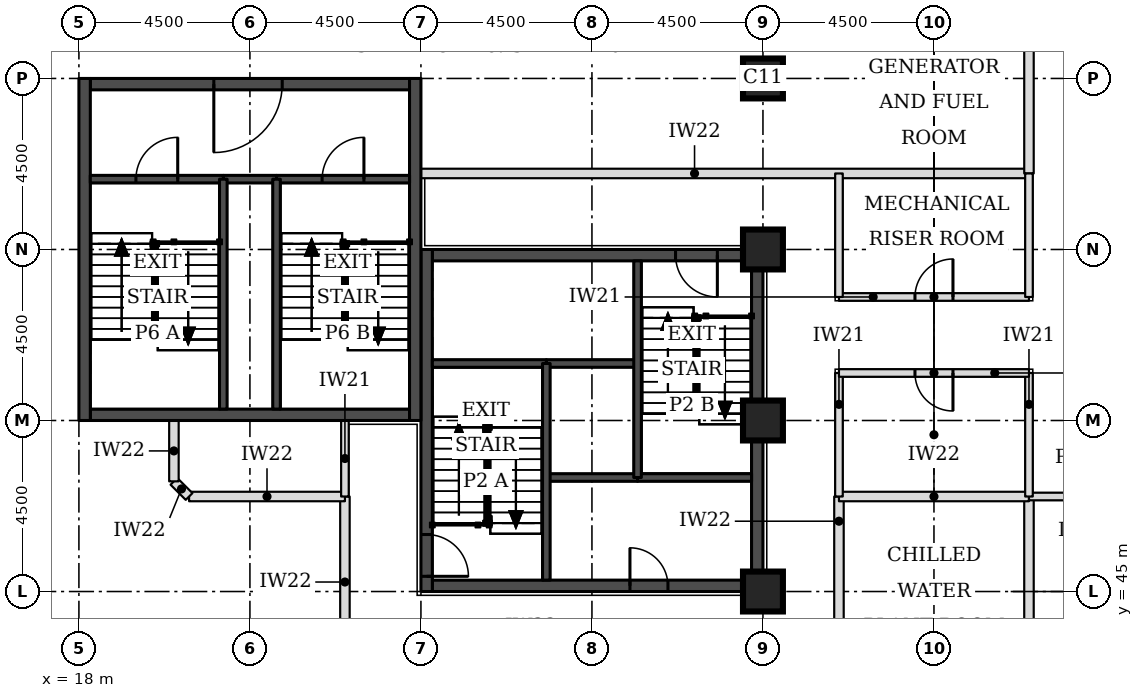
"""IFC4 building model, lengths in metres.
Left out: names, types, materials, properties, quantities, classifications, styles, units other than length and angle.
Written with IfcOpenShell. Run it as: python <this file> out.ifc"""

import sys

from ifc_helpers import new_model, si_unit, direction, frame, frame_2d, origin, origin_2d, place, context, subcontext, project, spatial, rectangle, extrude, element, fill, save


model = new_model("IFC4")
c1 = context("Model", 3, precision=1e-05, world=origin(), true_north=direction((0.0, 1.0)))
c2 = subcontext(c1, "Body", "Model", "MODEL_VIEW")
j1 = project(units=[si_unit("LENGTHUNIT", "METRE"), si_unit("PLANEANGLEUNIT", "RADIAN")], contexts=[c1])
p1 = place(None, origin())
s1 = spatial("IfcSite", under=j1, at=p1, CompositionType="ELEMENT")
p2 = place(p1, origin())
s2 = spatial("IfcBuilding", under=s1, at=p2, CompositionType="ELEMENT")
p3 = place(p2, frame((0.0, 0.0, 138.1)))
s3 = spatial("IfcBuildingStorey", under=s2, at=p3, CompositionType="ELEMENT", Elevation=138.1)
for number, where, z_axis, x_axis in (
    (1, (36.0, 45.0, 0.0), (0.0, 0.0, 1.0), (1.0, 0.0, 0.0)),
    (2, (36.0, 49.5, 0.0), (0.0, 0.0, 1.0), (1.0, 0.0, 0.0)),
    (3, (36.0, 54.0, 0.0), (0.0, 0.0, 1.0), (1.0, 0.0, 0.0)),
    (4, (36.0, 58.5, 0.0), (0.0, 0.0, 1.0), (1.0, 0.0, 0.0)),
):
    element("IfcColumn", number, at=place(p3, frame(where, z_axis=z_axis, x_axis=x_axis)), inside=s3, PredefinedType="COLUMN", context=c2, shape_type="SweptSolid", body=[
        extrude(rectangle(XDim=1.05, YDim=1.05, at=origin_2d()), origin(), (0.0, 0.0, 1.0), 5.0),
    ])
p4 = place(p3, frame((27.3, 45.15, 0.0), z_axis=(0.0, 0.0, 1.0), x_axis=(1.0, 0.0, 0.0)))
e5 = element("IfcWall", 5, at=p4, inside=s3, PredefinedType="SHEAR", context=c2, shape_type="SweptSolid", body=[
    extrude(rectangle(XDim=8.4, YDim=0.3, at=frame_2d((4.2, 0.0))), origin(), (0.0, 0.0, 1.0), 5.0),
])
p5 = place(p4, frame((5.2, 0.0, 0.0)))
e6 = element("IfcOpeningElement", 6, at=p5, cuts=e5, PredefinedType="OPENING", context=c2, shape_type="SweptSolid", body=[
    extrude(rectangle(XDim=1.0, YDim=2.1, at=frame_2d((0.5, 1.05))), frame((0.0, 0.16, 0.0), z_axis=(0.0, -1.0, 0.0), x_axis=(1.0, 0.0, 0.0)), (0.0, 0.0, 1.0), 0.32),
])
p6 = place(p3, frame((27.3, 53.85, 0.0), z_axis=(0.0, 0.0, 1.0), x_axis=(1.0, 0.0, 0.0)))
e7 = element("IfcWall", 7, at=p6, inside=s3, PredefinedType="SHEAR", context=c2, shape_type="SweptSolid", body=[
    extrude(rectangle(XDim=8.4, YDim=0.3, at=frame_2d((4.2, 0.0))), origin(), (0.0, 0.0, 1.0), 5.0),
])
p7 = place(p6, frame((6.4, 0.0, 0.0)))
e8 = element("IfcOpeningElement", 8, at=p7, cuts=e7, PredefinedType="OPENING", context=c2, shape_type="SweptSolid", body=[
    extrude(rectangle(XDim=1.1, YDim=2.1, at=frame_2d((0.55, 1.05))), frame((0.0, 0.16, 0.0), z_axis=(0.0, -1.0, 0.0), x_axis=(1.0, 0.0, 0.0)), (0.0, 0.0, 1.0), 0.32),
])
p8 = place(p3, frame((27.15, 45.0, 0.0), z_axis=(0.0, 0.0, 1.0), x_axis=(0.0, 1.0, 0.0)))
e9 = element("IfcWall", 9, at=p8, inside=s3, PredefinedType="SHEAR", context=c2, shape_type="SweptSolid", body=[
    extrude(rectangle(XDim=9.0, YDim=0.3, at=frame_2d((4.5, 0.0))), origin(), (0.0, 0.0, 1.0), 5.0),
])
p9 = place(p8, frame((0.4, 0.0, 0.0)))
e10 = element("IfcOpeningElement", 10, at=p9, cuts=e9, PredefinedType="OPENING", context=c2, shape_type="SweptSolid", body=[
    extrude(rectangle(XDim=1.1, YDim=2.1, at=frame_2d((0.55, 1.05))), frame((0.0, 0.16, 0.0), z_axis=(0.0, -1.0, 0.0), x_axis=(1.0, 0.0, 0.0)), (0.0, 0.0, 1.0), 0.32),
])
p10 = place(p3, frame((35.85, 45.0, 0.0), z_axis=(0.0, 0.0, 1.0), x_axis=(0.0, 1.0, 0.0)))
e11 = element("IfcWall", 11, at=p10, inside=s3, PredefinedType="SHEAR", context=c2, shape_type="SweptSolid", body=[
    extrude(rectangle(XDim=9.0, YDim=0.3, at=frame_2d((4.5, 0.0))), origin(), (0.0, 0.0, 1.0), 5.0),
])
p11 = place(p3, frame((18.3, 49.65, 0.0), z_axis=(0.0, 0.0, 1.0), x_axis=(1.0, 0.0, 0.0)))
e12 = element("IfcWall", 12, at=p11, inside=s3, PredefinedType="SHEAR", context=c2, shape_type="SweptSolid", body=[
    extrude(rectangle(XDim=8.4, YDim=0.3, at=frame_2d((4.2, 0.0))), origin(), (0.0, 0.0, 1.0), 5.0),
])
p12 = place(p3, frame((18.3, 58.35, 0.0), z_axis=(0.0, 0.0, 1.0), x_axis=(1.0, 0.0, 0.0)))
e13 = element("IfcWall", 13, at=p12, inside=s3, PredefinedType="SHEAR", context=c2, shape_type="SweptSolid", body=[
    extrude(rectangle(XDim=8.4, YDim=0.3, at=frame_2d((4.2, 0.0))), origin(), (0.0, 0.0, 1.0), 5.0),
])
p13 = place(p12, frame((3.25, 0.0, 0.0)))
e14 = element("IfcOpeningElement", 14, at=p13, cuts=e13, PredefinedType="OPENING", context=c2, shape_type="SweptSolid", body=[
    extrude(rectangle(XDim=1.8, YDim=2.1, at=frame_2d((0.9, 1.05))), frame((0.0, 0.16, 0.0), z_axis=(0.0, -1.0, 0.0), x_axis=(1.0, 0.0, 0.0)), (0.0, 0.0, 1.0), 0.32),
])
for number, where, z_axis, x_axis in (
    (15, (18.15, 49.5, 0.0), (0.0, 0.0, 1.0), (0.0, 1.0, 0.0)),
    (16, (26.85, 49.5, 0.0), (0.0, 0.0, 1.0), (0.0, 1.0, 0.0)),
):
    element("IfcWall", number, at=place(p3, frame(where, z_axis=z_axis, x_axis=x_axis)), inside=s3, PredefinedType="SHEAR", context=c2, shape_type="SweptSolid", body=[
        extrude(rectangle(XDim=9.0, YDim=0.3, at=frame_2d((4.5, 0.0))), origin(), (0.0, 0.0, 1.0), 5.0),
    ])
p14 = place(p3, frame((43.0, 42.5, 0.0), z_axis=(0.0, 0.0, 1.0), x_axis=(0.0, 1.0, 0.0)))
e17 = element("IfcWall", 17, at=p14, inside=s3, PredefinedType="PARTITIONING", context=c2, shape_type="SweptSolid", body=[
    extrude(rectangle(XDim=5.0, YDim=0.25, at=frame_2d((2.5, 0.0))), origin(), (0.0, 0.0, 1.0), 4.85),
])
for number, where, z_axis, x_axis in (
    (18, (25.0, 43.0, 0.0), (0.0, 0.0, 1.0), (0.0, 1.0, 0.0)),
    (19, (38.0, 43.0, 0.0), (0.0, 0.0, 1.0), (0.0, 1.0, 0.0)),
):
    element("IfcWall", number, at=place(p3, frame(where, z_axis=z_axis, x_axis=x_axis)), inside=s3, PredefinedType="PARTITIONING", context=c2, shape_type="SweptSolid", body=[
        extrude(rectangle(XDim=4.5, YDim=0.25, at=frame_2d((2.25, 0.0))), origin(), (0.0, 0.0, 1.0), 4.85),
    ])
p15 = place(p3, frame((20.899, 47.5, 0.0), z_axis=(0.0, 0.0, 1.0), x_axis=(1.0, 0.0, 0.0)))
e20 = element("IfcWall", 20, at=p15, inside=s3, PredefinedType="PARTITIONING", context=c2, shape_type="SweptSolid", body=[
    extrude(rectangle(XDim=4.101, YDim=0.25, at=frame_2d((2.051, 0.0))), origin(), (0.0, 0.0, 1.0), 4.85),
])
p16 = place(p3, frame((38.0, 47.5, 0.0), z_axis=(0.0, 0.0, 1.0), x_axis=(1.0, 0.0, 0.0)))
e21 = element("IfcWall", 21, at=p16, inside=s3, PredefinedType="PARTITIONING", context=c2, shape_type="SweptSolid", body=[
    extrude(rectangle(XDim=5.0, YDim=0.25, at=frame_2d((2.5, 0.0))), origin(), (0.0, 0.0, 1.0), 4.85),
])
p17 = place(p3, frame((20.5, 47.899, 0.0), z_axis=(0.0, 0.0, 1.0), x_axis=(0.707106781187, -0.707106781187, 0.0)))
e22 = element("IfcWall", 22, at=p17, inside=s3, PredefinedType="PARTITIONING", context=c2, shape_type="SweptSolid", body=[
    extrude(rectangle(XDim=0.564, YDim=0.25, at=frame_2d((0.282, 0.0))), origin(), (0.0, 0.0, 1.0), 4.85),
])
p18 = place(p3, frame((20.5, 47.899, 0.0), z_axis=(0.0, 0.0, 1.0), x_axis=(0.0, 1.0, 0.0)))
e23 = element("IfcWall", 23, at=p18, inside=s3, PredefinedType="PARTITIONING", context=c2, shape_type="SweptSolid", body=[
    extrude(rectangle(XDim=1.601, YDim=0.25, at=frame_2d((0.801, 0.0))), origin(), (0.0, 0.0, 1.0), 4.85),
])
p19 = place(p3, frame((27.0, 56.0, 0.0), z_axis=(0.0, 0.0, 1.0), x_axis=(1.0, 0.0, 0.0)))
e24 = element("IfcWall", 24, at=p19, inside=s3, PredefinedType="PARTITIONING", context=c2, shape_type="SweptSolid", body=[
    extrude(rectangle(XDim=16.0, YDim=0.25, at=frame_2d((8.0, 0.0))), origin(), (0.0, 0.0, 1.0), 4.85),
])
p20 = place(p3, frame((43.0, 56.0, 0.0), z_axis=(0.0, 0.0, 1.0), x_axis=(0.0, 1.0, 0.0)))
e25 = element("IfcWall", 25, at=p20, inside=s3, PredefinedType="PARTITIONING", context=c2, shape_type="SweptSolid", body=[
    extrude(rectangle(XDim=18.0, YDim=0.25, at=frame_2d((9.0, 0.0))), origin(), (0.0, 0.0, 1.0), 4.85),
])
p21 = place(p3, frame((25.0, 47.5, 0.0), z_axis=(0.0, 0.0, 1.0), x_axis=(0.0, 1.0, 0.0)))
e26 = element("IfcWall", 26, at=p21, inside=s3, PredefinedType="PARTITIONING", context=c2, shape_type="SweptSolid", body=[
    extrude(rectangle(XDim=2.0, YDim=0.2, at=frame_2d((1.0, 0.0))), origin(), (0.0, 0.0, 1.0), 4.85),
])
for number, where, z_axis, x_axis in (
    (27, (38.0, 47.5, 0.0), (0.0, 0.0, 1.0), (0.0, 1.0, 0.0)),
    (28, (43.0, 47.5, 0.0), (0.0, 0.0, 1.0), (1.0, 0.0, 0.0)),
    (29, (43.0, 47.5, 0.0), (0.0, 0.0, 1.0), (0.0, 1.0, 0.0)),
):
    element("IfcWall", number, at=place(p3, frame(where, z_axis=z_axis, x_axis=x_axis)), inside=s3, PredefinedType="PARTITIONING", context=c2, shape_type="SweptSolid", body=[
        extrude(rectangle(XDim=3.25, YDim=0.2, at=frame_2d((1.625, 0.0))), origin(), (0.0, 0.0, 1.0), 4.85),
    ])
p22 = place(p3, frame((38.0, 50.75, 0.0), z_axis=(0.0, 0.0, 1.0), x_axis=(1.0, 0.0, 0.0)))
e30 = element("IfcWall", 30, at=p22, inside=s3, PredefinedType="PARTITIONING", context=c2, shape_type="SweptSolid", body=[
    extrude(rectangle(XDim=5.0, YDim=0.2, at=frame_2d((2.5, 0.0))), origin(), (0.0, 0.0, 1.0), 4.85),
])
p23 = place(p22, frame((2.0, 0.0, 0.0)))
e31 = element("IfcOpeningElement", 31, at=p23, cuts=e30, PredefinedType="OPENING", context=c2, shape_type="SweptSolid", body=[
    extrude(rectangle(XDim=1.0, YDim=2.1, at=frame_2d((0.5, 1.05))), frame((0.0, 0.11, 0.0), z_axis=(0.0, -1.0, 0.0), x_axis=(1.0, 0.0, 0.0)), (0.0, 0.0, 1.0), 0.22),
])
p24 = place(p3, frame((38.0, 52.75, 0.0), z_axis=(0.0, 0.0, 1.0), x_axis=(1.0, 0.0, 0.0)))
e32 = element("IfcWall", 32, at=p24, inside=s3, PredefinedType="PARTITIONING", context=c2, shape_type="SweptSolid", body=[
    extrude(rectangle(XDim=5.0, YDim=0.2, at=frame_2d((2.5, 0.0))), origin(), (0.0, 0.0, 1.0), 4.85),
])
p25 = place(p24, frame((2.0, 0.0, 0.0)))
e33 = element("IfcOpeningElement", 33, at=p25, cuts=e32, PredefinedType="OPENING", context=c2, shape_type="SweptSolid", body=[
    extrude(rectangle(XDim=1.0, YDim=2.1, at=frame_2d((0.5, 1.05))), frame((0.0, 0.11, 0.0), z_axis=(0.0, -1.0, 0.0), x_axis=(1.0, 0.0, 0.0)), (0.0, 0.0, 1.0), 0.22),
])
for number, where, z_axis, x_axis in (
    (34, (38.0, 52.75, 0.0), (0.0, 0.0, 1.0), (0.0, 1.0, 0.0)),
    (35, (43.0, 52.75, 0.0), (0.0, 0.0, 1.0), (0.0, 1.0, 0.0)),
):
    element("IfcWall", number, at=place(p3, frame(where, z_axis=z_axis, x_axis=x_axis)), inside=s3, PredefinedType="PARTITIONING", context=c2, shape_type="SweptSolid", body=[
        extrude(rectangle(XDim=3.25, YDim=0.2, at=frame_2d((1.625, 0.0))), origin(), (0.0, 0.0, 1.0), 4.85),
    ])
p26 = place(p3, frame((30.3, 48.0, 0.0), z_axis=(0.0, 0.0, 1.0), x_axis=(1.0, 0.0, 0.0)))
e36 = element("IfcWall", 36, at=p26, inside=s3, PredefinedType="SOLIDWALL", context=c2, shape_type="SweptSolid", body=[
    extrude(rectangle(XDim=2.4, YDim=0.2, at=frame_2d((1.2, 0.0))), origin(), (0.0, 0.0, 1.0), 4.85),
])
p27 = place(p3, frame((32.7, 48.0, 0.0), z_axis=(0.0, 0.0, 1.0), x_axis=(1.0, 0.0, 0.0)))
e37 = element("IfcWall", 37, at=p27, inside=s3, PredefinedType="SOLIDWALL", context=c2, shape_type="SweptSolid", body=[
    extrude(rectangle(XDim=3.0, YDim=0.2, at=frame_2d((1.5, 0.0))), origin(), (0.0, 0.0, 1.0), 4.85),
])
p28 = place(p3, frame((30.3, 51.0, 0.0), z_axis=(0.0, 0.0, 1.0), x_axis=(1.0, 0.0, 0.0)))
e38 = element("IfcWall", 38, at=p28, inside=s3, PredefinedType="SOLIDWALL", context=c2, shape_type="SweptSolid", body=[
    extrude(rectangle(XDim=2.4, YDim=0.2, at=frame_2d((1.2, 0.0))), origin(), (0.0, 0.0, 1.0), 5.0),
])
p29 = place(p3, frame((27.3, 51.0, 0.0), z_axis=(0.0, 0.0, 1.0), x_axis=(1.0, 0.0, 0.0)))
e39 = element("IfcWall", 39, at=p29, inside=s3, PredefinedType="SOLIDWALL", context=c2, shape_type="SweptSolid", body=[
    extrude(rectangle(XDim=3.0, YDim=0.2, at=frame_2d((1.5, 0.0))), origin(), (0.0, 0.0, 1.0), 4.85),
])
for number, where, z_axis, x_axis in (
    (40, (30.3, 45.3, 0.0), (0.0, 0.0, 1.0), (0.0, 1.0, 0.0)),
    (41, (32.7, 48.0, 0.0), (0.0, 0.0, 1.0), (0.0, 1.0, 0.0)),
):
    element("IfcWall", number, at=place(p3, frame(where, z_axis=z_axis, x_axis=x_axis)), inside=s3, PredefinedType="SOLIDWALL", context=c2, shape_type="SweptSolid", body=[
        extrude(rectangle(XDim=5.7, YDim=0.2, at=frame_2d((2.85, 0.0))), origin(), (0.0, 0.0, 1.0), 4.85),
    ])
p30 = place(p3, frame((21.8, 55.85, 0.0), z_axis=(0.0, 0.0, 1.0), x_axis=(1.0, 0.0, 0.0)))
e42 = element("IfcWall", 42, at=p30, inside=s3, PredefinedType="SOLIDWALL", context=c2, shape_type="SweptSolid", body=[
    extrude(rectangle(XDim=1.4, YDim=0.2, at=frame_2d((0.7, 0.0))), origin(), (0.0, 0.0, 1.0), 4.85),
])
p31 = place(p3, frame((18.3, 55.85, 0.0), z_axis=(0.0, 0.0, 1.0), x_axis=(1.0, 0.0, 0.0)))
e43 = element("IfcWall", 43, at=p31, inside=s3, PredefinedType="SOLIDWALL", context=c2, shape_type="SweptSolid", body=[
    extrude(rectangle(XDim=3.5, YDim=0.2, at=frame_2d((1.75, 0.0))), origin(), (0.0, 0.0, 1.0), 4.85),
])
p32 = place(p31, frame((1.2, 0.0, 0.0)))
e44 = element("IfcOpeningElement", 44, at=p32, cuts=e43, PredefinedType="OPENING", context=c2, shape_type="SweptSolid", body=[
    extrude(rectangle(XDim=1.1, YDim=2.1, at=frame_2d((0.55, 1.05))), frame((0.0, 0.11, 0.0), z_axis=(0.0, -1.0, 0.0), x_axis=(1.0, 0.0, 0.0)), (0.0, 0.0, 1.0), 0.22),
])
p33 = place(p3, frame((23.2, 55.85, 0.0), z_axis=(0.0, 0.0, 1.0), x_axis=(1.0, 0.0, 0.0)))
e45 = element("IfcWall", 45, at=p33, inside=s3, PredefinedType="SOLIDWALL", context=c2, shape_type="SweptSolid", body=[
    extrude(rectangle(XDim=3.5, YDim=0.2, at=frame_2d((1.75, 0.0))), origin(), (0.0, 0.0, 1.0), 4.85),
])
p34 = place(p33, frame((1.2, 0.0, 0.0)))
e46 = element("IfcOpeningElement", 46, at=p34, cuts=e45, PredefinedType="OPENING", context=c2, shape_type="SweptSolid", body=[
    extrude(rectangle(XDim=1.1, YDim=2.1, at=frame_2d((0.55, 1.05))), frame((0.0, 0.11, 0.0), z_axis=(0.0, -1.0, 0.0), x_axis=(1.0, 0.0, 0.0)), (0.0, 0.0, 1.0), 0.22),
])
for number, where, z_axis, x_axis in (
    (47, (21.8, 49.8, 0.0), (0.0, 0.0, 1.0), (0.0, 1.0, 0.0)),
    (48, (23.2, 49.8, 0.0), (0.0, 0.0, 1.0), (0.0, 1.0, 0.0)),
):
    element("IfcWall", number, at=place(p3, frame(where, z_axis=z_axis, x_axis=x_axis)), inside=s3, PredefinedType="SOLIDWALL", context=c2, shape_type="SweptSolid", body=[
        extrude(rectangle(XDim=6.05, YDim=0.2, at=frame_2d((3.025, 0.0))), origin(), (0.0, 0.0, 1.0), 4.85),
    ])
p35 = place(p23, frame((1.0, 0.0, 0.0), z_axis=(0.0, 0.0, 1.0), x_axis=(-1.0, 0.0, 0.0)))
e49 = element("IfcDoor", 49, at=p35, inside=s3, OperationType="SINGLE_SWING_LEFT", PredefinedType="DOOR", context=c2, shape_type="SweptSolid", body=[
    extrude(rectangle(XDim=1.0, YDim=2.1, at=frame_2d((0.5, 1.05))), frame((0.0, 0.025, 0.0), z_axis=(0.0, -1.0, 0.0), x_axis=(1.0, 0.0, 0.0)), (0.0, 0.0, 1.0), 0.05),
])
fill(e31, e49)
p36 = place(p25, origin())
e50 = element("IfcDoor", 50, at=p36, inside=s3, OperationType="SINGLE_SWING_RIGHT", PredefinedType="DOOR", context=c2, shape_type="SweptSolid", body=[
    extrude(rectangle(XDim=1.0, YDim=2.1, at=frame_2d((0.5, 1.05))), frame((0.0, 0.025, 0.0), z_axis=(0.0, -1.0, 0.0), x_axis=(1.0, 0.0, 0.0)), (0.0, 0.0, 1.0), 0.05),
])
fill(e33, e50)
p37 = place(p9, frame((1.1, 0.0, 0.0), z_axis=(0.0, 0.0, 1.0), x_axis=(-1.0, 0.0, 0.0)))
e51 = element("IfcDoor", 51, at=p37, inside=s3, OperationType="SINGLE_SWING_RIGHT", PredefinedType="DOOR", context=c2, shape_type="SweptSolid", body=[
    extrude(rectangle(XDim=1.1, YDim=2.1, at=frame_2d((0.55, 1.05))), frame((0.0, 0.025, 0.0), z_axis=(0.0, -1.0, 0.0), x_axis=(1.0, 0.0, 0.0)), (0.0, 0.0, 1.0), 0.05),
])
fill(e10, e51)
p38 = place(p7, frame((1.1, 0.0, 0.0), z_axis=(0.0, 0.0, 1.0), x_axis=(-1.0, 0.0, 0.0)))
e52 = element("IfcDoor", 52, at=p38, inside=s3, OperationType="SINGLE_SWING_LEFT", PredefinedType="DOOR", context=c2, shape_type="SweptSolid", body=[
    extrude(rectangle(XDim=1.1, YDim=2.1, at=frame_2d((0.55, 1.05))), frame((0.0, 0.025, 0.0), z_axis=(0.0, -1.0, 0.0), x_axis=(1.0, 0.0, 0.0)), (0.0, 0.0, 1.0), 0.05),
])
fill(e8, e52)
p39 = place(p5, origin())
e53 = element("IfcDoor", 53, at=p39, inside=s3, OperationType="SINGLE_SWING_LEFT", PredefinedType="DOOR", context=c2, shape_type="SweptSolid", body=[
    extrude(rectangle(XDim=1.0, YDim=2.1, at=frame_2d((0.5, 1.05))), frame((0.0, 0.025, 0.0), z_axis=(0.0, -1.0, 0.0), x_axis=(1.0, 0.0, 0.0)), (0.0, 0.0, 1.0), 0.05),
])
fill(e6, e53)
p40 = place(p32, origin())
e54 = element("IfcDoor", 54, at=p40, inside=s3, OperationType="SINGLE_SWING_RIGHT", PredefinedType="DOOR", context=c2, shape_type="SweptSolid", body=[
    extrude(rectangle(XDim=1.1, YDim=2.1, at=frame_2d((0.55, 1.05))), frame((0.0, 0.025, 0.0), z_axis=(0.0, -1.0, 0.0), x_axis=(1.0, 0.0, 0.0)), (0.0, 0.0, 1.0), 0.05),
])
fill(e44, e54)
p41 = place(p34, origin())
e55 = element("IfcDoor", 55, at=p41, inside=s3, OperationType="SINGLE_SWING_RIGHT", PredefinedType="DOOR", context=c2, shape_type="SweptSolid", body=[
    extrude(rectangle(XDim=1.1, YDim=2.1, at=frame_2d((0.55, 1.05))), frame((0.0, 0.025, 0.0), z_axis=(0.0, -1.0, 0.0), x_axis=(1.0, 0.0, 0.0)), (0.0, 0.0, 1.0), 0.05),
])
fill(e46, e55)
p42 = place(p13, frame((1.8, 0.0, 0.0), z_axis=(0.0, 0.0, 1.0), x_axis=(-1.0, 0.0, 0.0)))
e56 = element("IfcDoor", 56, at=p42, inside=s3, OperationType="SINGLE_SWING_RIGHT", PredefinedType="DOOR", context=c2, shape_type="SweptSolid", body=[
    extrude(rectangle(XDim=1.8, YDim=2.1, at=frame_2d((0.9, 1.05))), frame((0.0, 0.025, 0.0), z_axis=(0.0, -1.0, 0.0), x_axis=(1.0, 0.0, 0.0)), (0.0, 0.0, 1.0), 0.05),
])
fill(e14, e56)
save(model, sys.argv[1])
